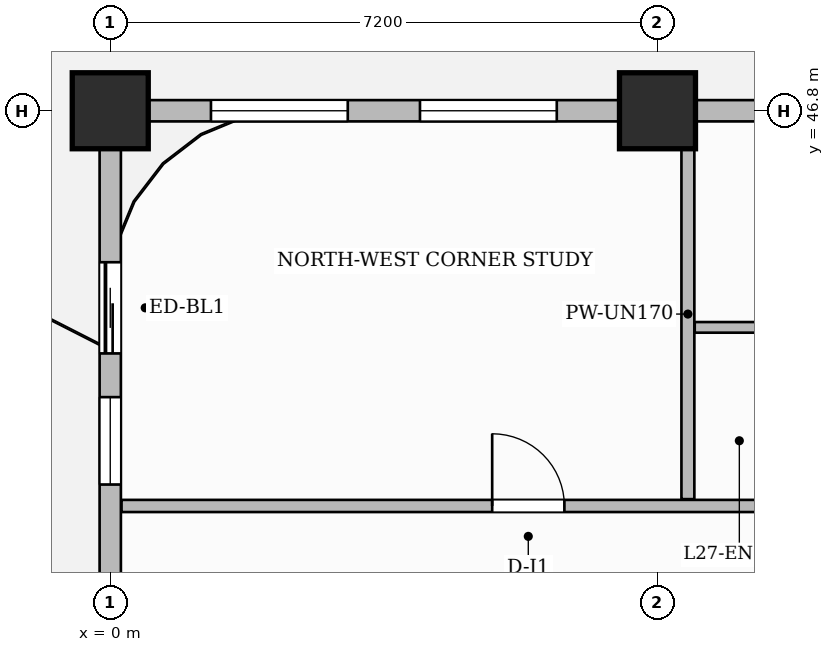
"""IFC4 building model, lengths in metres.
Left out: names, types, materials, properties, quantities, classifications, styles, units other than length and angle.
Written with IfcOpenShell. Run it as: python <this file> out.ifc"""

import sys

from ifc_helpers import new_model, si_unit, direction, frame, frame_2d, origin, origin_2d, place, context, subcontext, project, spatial, rectangle, extrude, source, transform, mapped, element, fill, save


model = new_model("IFC4")
c1 = context("Model", 3, precision=1e-05, world=origin(), true_north=direction((0.0, 1.0)))
c2 = subcontext(c1, "Body", "Model", "MODEL_VIEW")
j1 = project(units=[si_unit("LENGTHUNIT", "METRE"), si_unit("PLANEANGLEUNIT", "RADIAN")], contexts=[c1])
p1 = place(None, origin())
s1 = spatial("IfcSite", under=j1, at=p1, CompositionType="ELEMENT")
p2 = place(p1, origin())
s2 = spatial("IfcBuilding", under=s1, at=p2, CompositionType="ELEMENT")
p3 = place(p2, frame((0.0, 0.0, 111.8)))
s3 = spatial("IfcBuildingStorey", under=s2, at=p3, CompositionType="ELEMENT", Elevation=111.8)
m1 = source(origin(), c2, "Body", "SweptSolid", [
    extrude(rectangle(XDim=1.0, YDim=1.0, at=origin_2d()), origin(), (0.0, 0.0, 1.0), 3.7),
])
for number, where, z_axis, x_axis in (
    (1, (0.0, 46.8, 0.0), (0.0, 0.0, 1.0), (1.0, 0.0, 0.0)),
    (2, (7.2, 46.8, 0.0), (0.0, 0.0, 1.0), (1.0, 0.0, 0.0)),
):
    element("IfcColumn", number, at=place(p3, frame(where, z_axis=z_axis, x_axis=x_axis)), inside=s3, PredefinedType="COLUMN", context=c2, shape_type="MappedRepresentation", body=[
        mapped(m1, transform((0.0, 0.0, 0.0), scale=1.0)),
    ])
p4 = place(p3, frame((7.6, 41.69, 0.0), z_axis=(0.0, 0.0, 1.0), x_axis=(0.0, 1.0, 0.0)))
e3 = element("IfcWall", 3, at=p4, inside=s3, PredefinedType="PARTITIONING", context=c2, shape_type="SweptSolid", body=[
    extrude(rectangle(XDim=4.87, YDim=0.17, at=frame_2d((2.435, 0.0))), origin(), (0.0, 0.0, 1.0), 3.45),
])
p5 = place(p3, frame((0.148, 41.6, 0.0), z_axis=(0.0, 0.0, 1.0), x_axis=(1.0, 0.0, 0.0)))
e4 = element("IfcWall", 4, at=p5, inside=s3, PredefinedType="PARTITIONING", context=c2, shape_type="SweptSolid", body=[
    extrude(rectangle(XDim=14.812, YDim=0.16, at=frame_2d((7.406, 0.0))), origin(), (0.0, 0.0, 1.0), 2.935),
])
p6 = place(p5, frame((4.877, 0.0, 0.0)))
e5 = element("IfcOpeningElement", 5, at=p6, cuts=e4, PredefinedType="OPENING", context=c2, shape_type="SweptSolid", body=[
    extrude(rectangle(XDim=0.95, YDim=2.15, at=frame_2d((0.475, 1.075))), frame((0.0, 0.09, 0.0), z_axis=(0.0, -1.0, 0.0), x_axis=(1.0, 0.0, 0.0)), (0.0, 0.0, 1.0), 0.18),
])
p7 = place(p3, frame((7.69, 43.95, 0.0), z_axis=(0.0, 0.0, 1.0), x_axis=(1.0, 0.0, 0.0)))
e6 = element("IfcWall", 6, at=p7, inside=s3, PredefinedType="PARTITIONING", context=c2, shape_type="SweptSolid", body=[
    extrude(rectangle(XDim=2.07, YDim=0.14, at=frame_2d((1.035, 0.0))), origin(), (0.0, 0.0, 1.0), 2.935),
])
p8 = place(p3, frame((0.0, 25.25, 0.0), z_axis=(0.0, 0.0, 1.0), x_axis=(0.0, 1.0, 0.0)))
e7 = element("IfcWall", 7, at=p8, inside=s3, PredefinedType="SOLIDWALL", context=c2, shape_type="SweptSolid", body=[
    extrude(rectangle(XDim=21.5, YDim=0.28, at=frame_2d((10.75, 0.0))), origin(), (0.0, 0.0, 1.0), 2.935),
])
p9 = place(p8, frame((18.357, 0.0, 0.0)))
e8 = element("IfcOpeningElement", 8, at=p9, cuts=e7, PredefinedType="OPENING", context=c2, shape_type="SweptSolid", body=[
    extrude(rectangle(XDim=1.2, YDim=2.2, at=frame_2d((0.6, 1.1))), frame((0.0, 0.15, 0.0), z_axis=(0.0, -1.0, 0.0), x_axis=(1.0, 0.0, 0.0)), (0.0, 0.0, 1.0), 0.3),
])
p10 = place(p8, frame((0.8, 0.0, 0.0)))
e9 = element("IfcOpeningElement", 9, at=p10, cuts=e7, PredefinedType="OPENING", context=c2, shape_type="SweptSolid", body=[
    extrude(rectangle(XDim=1.2, YDim=2.2, at=frame_2d((0.6, 1.1))), frame((0.0, 0.15, 0.0), z_axis=(0.0, -1.0, 0.0), x_axis=(1.0, 0.0, 0.0)), (0.0, 0.0, 1.0), 0.3),
])
p11 = place(p8, frame((3.425, 0.0, 0.8)))
e10 = element("IfcOpeningElement", 10, at=p11, cuts=e7, PredefinedType="OPENING", context=c2, shape_type="SweptSolid", body=[
    extrude(rectangle(XDim=1.8, YDim=1.85, at=frame_2d((0.9, 0.925))), frame((0.0, 0.15, 0.0), z_axis=(0.0, -1.0, 0.0), x_axis=(1.0, 0.0, 0.0)), (0.0, 0.0, 1.0), 0.3),
])
p12 = place(p8, frame((8.475, 0.0, 0.8)))
e11 = element("IfcOpeningElement", 11, at=p12, cuts=e7, PredefinedType="OPENING", context=c2, shape_type="SweptSolid", body=[
    extrude(rectangle(XDim=1.8, YDim=1.85, at=frame_2d((0.9, 0.925))), frame((0.0, 0.15, 0.0), z_axis=(0.0, -1.0, 0.0), x_axis=(1.0, 0.0, 0.0)), (0.0, 0.0, 1.0), 0.3),
])
p13 = place(p8, frame((11.225, 0.0, 0.8)))
e12 = element("IfcOpeningElement", 12, at=p13, cuts=e7, PredefinedType="OPENING", context=c2, shape_type="SweptSolid", body=[
    extrude(rectangle(XDim=1.8, YDim=1.85, at=frame_2d((0.9, 0.925))), frame((0.0, 0.15, 0.0), z_axis=(0.0, -1.0, 0.0), x_axis=(1.0, 0.0, 0.0)), (0.0, 0.0, 1.0), 0.3),
])
p14 = place(p8, frame((16.632, 0.0, 0.8)))
e13 = element("IfcOpeningElement", 13, at=p14, cuts=e7, PredefinedType="OPENING", context=c2, shape_type="SweptSolid", body=[
    extrude(rectangle(XDim=1.15, YDim=1.8, at=frame_2d((0.575, 0.9))), frame((0.0, 0.15, 0.0), z_axis=(0.0, -1.0, 0.0), x_axis=(1.0, 0.0, 0.0)), (0.0, 0.0, 1.0), 0.3),
])
p15 = place(p3, frame((0.0, 46.8, 0.0), z_axis=(0.0, 0.0, 1.0), x_axis=(1.0, 0.0, 0.0)))
e14 = element("IfcWall", 14, at=p15, inside=s3, PredefinedType="SOLIDWALL", context=c2, shape_type="SweptSolid", body=[
    extrude(rectangle(XDim=18.0, YDim=0.28, at=frame_2d((9.0, 0.0))), origin(), (0.0, 0.0, 1.0), 2.935),
])
p16 = place(p15, frame((1.325, 0.0, 0.8)))
e15 = element("IfcOpeningElement", 15, at=p16, cuts=e14, PredefinedType="OPENING", context=c2, shape_type="SweptSolid", body=[
    extrude(rectangle(XDim=1.8, YDim=1.85, at=frame_2d((0.9, 0.925))), frame((0.0, 0.15, 0.0), z_axis=(0.0, -1.0, 0.0), x_axis=(1.0, 0.0, 0.0)), (0.0, 0.0, 1.0), 0.3),
])
p17 = place(p15, frame((4.075, 0.0, 0.8)))
e16 = element("IfcOpeningElement", 16, at=p17, cuts=e14, PredefinedType="OPENING", context=c2, shape_type="SweptSolid", body=[
    extrude(rectangle(XDim=1.8, YDim=1.85, at=frame_2d((0.9, 0.925))), frame((0.0, 0.15, 0.0), z_axis=(0.0, -1.0, 0.0), x_axis=(1.0, 0.0, 0.0)), (0.0, 0.0, 1.0), 0.3),
])
p18 = place(p15, frame((8.525, 0.0, 0.8)))
e17 = element("IfcOpeningElement", 17, at=p18, cuts=e14, PredefinedType="OPENING", context=c2, shape_type="SweptSolid", body=[
    extrude(rectangle(XDim=1.8, YDim=1.85, at=frame_2d((0.9, 0.925))), frame((0.0, 0.15, 0.0), z_axis=(0.0, -1.0, 0.0), x_axis=(1.0, 0.0, 0.0)), (0.0, 0.0, 1.0), 0.3),
])
p19 = place(p15, frame((11.275, 0.0, 0.8)))
e18 = element("IfcOpeningElement", 18, at=p19, cuts=e14, PredefinedType="OPENING", context=c2, shape_type="SweptSolid", body=[
    extrude(rectangle(XDim=1.8, YDim=1.85, at=frame_2d((0.9, 0.925))), frame((0.0, 0.15, 0.0), z_axis=(0.0, -1.0, 0.0), x_axis=(1.0, 0.0, 0.0)), (0.0, 0.0, 1.0), 0.3),
])
p20 = place(p15, frame((15.5, 0.0, 0.8)))
e19 = element("IfcOpeningElement", 19, at=p20, cuts=e14, PredefinedType="OPENING", context=c2, shape_type="SweptSolid", body=[
    extrude(rectangle(XDim=1.4, YDim=1.85, at=frame_2d((0.7, 0.925))), frame((0.0, 0.15, 0.0), z_axis=(0.0, -1.0, 0.0), x_axis=(1.0, 0.0, 0.0)), (0.0, 0.0, 1.0), 0.3),
])
m2 = source(origin(), c2, "Body", "SweptSolid", [
    extrude(rectangle(XDim=0.95, YDim=2.15, at=frame_2d((0.475, 1.075))), frame((0.0, 0.025, 0.0), z_axis=(0.0, -1.0, 0.0), x_axis=(1.0, 0.0, 0.0)), (0.0, 0.0, 1.0), 0.05),
])
p21 = place(p6, origin())
e20 = element("IfcDoor", 20, at=p21, inside=s3, OperationType="SINGLE_SWING_LEFT", PredefinedType="DOOR", context=c2, shape_type="MappedRepresentation", body=[
    mapped(m2, transform((0.0, 0.0, 0.0), scale=1.0)),
])
fill(e5, e20)
m3 = source(origin(), c2, "Body", "SweptSolid", [
    extrude(rectangle(XDim=1.2, YDim=2.2, at=frame_2d((0.6, 1.1))), frame((0.0, 0.025, 0.0), z_axis=(0.0, -1.0, 0.0), x_axis=(1.0, 0.0, 0.0)), (0.0, 0.0, 1.0), 0.05),
])
p22 = place(p9, origin())
e21 = element("IfcDoor", 21, at=p22, inside=s3, OperationType="SLIDING_TO_LEFT", PredefinedType="DOOR", context=c2, shape_type="MappedRepresentation", body=[
    mapped(m3, transform((0.0, 0.0, 0.0), scale=1.0)),
])
fill(e8, e21)
m4 = source(origin(), c2, "Body", "SweptSolid", [
    extrude(rectangle(XDim=1.15, YDim=1.8, at=frame_2d((0.575, 0.9))), frame((0.0, 0.03, 0.0), z_axis=(0.0, -1.0, 0.0), x_axis=(1.0, 0.0, 0.0)), (0.0, 0.0, 1.0), 0.06),
])
p23 = place(p14, origin())
e22 = element("IfcWindow", 22, at=p23, inside=s3, PartitioningType="SINGLE_PANEL", PredefinedType="WINDOW", context=c2, shape_type="MappedRepresentation", body=[
    mapped(m4, transform((0.0, 0.0, 0.0), scale=1.0)),
])
fill(e13, e22)
m5 = source(origin(), c2, "Body", "SweptSolid", [
    extrude(rectangle(XDim=1.8, YDim=1.85, at=frame_2d((0.9, 0.925))), frame((0.0, 0.03, 0.0), z_axis=(0.0, -1.0, 0.0), x_axis=(1.0, 0.0, 0.0)), (0.0, 0.0, 1.0), 0.06),
])
p24 = place(p16, origin())
e23 = element("IfcWindow", 23, at=p24, inside=s3, PartitioningType="DOUBLE_PANEL_VERTICAL", PredefinedType="WINDOW", context=c2, shape_type="MappedRepresentation", body=[
    mapped(m5, transform((0.0, 0.0, 0.0), scale=1.0)),
])
fill(e15, e23)
p25 = place(p17, origin())
e24 = element("IfcWindow", 24, at=p25, inside=s3, PartitioningType="DOUBLE_PANEL_VERTICAL", PredefinedType="WINDOW", context=c2, shape_type="MappedRepresentation", body=[
    mapped(m5, transform((0.0, 0.0, 0.0), scale=1.0)),
])
fill(e16, e24)
save(model, sys.argv[1])
